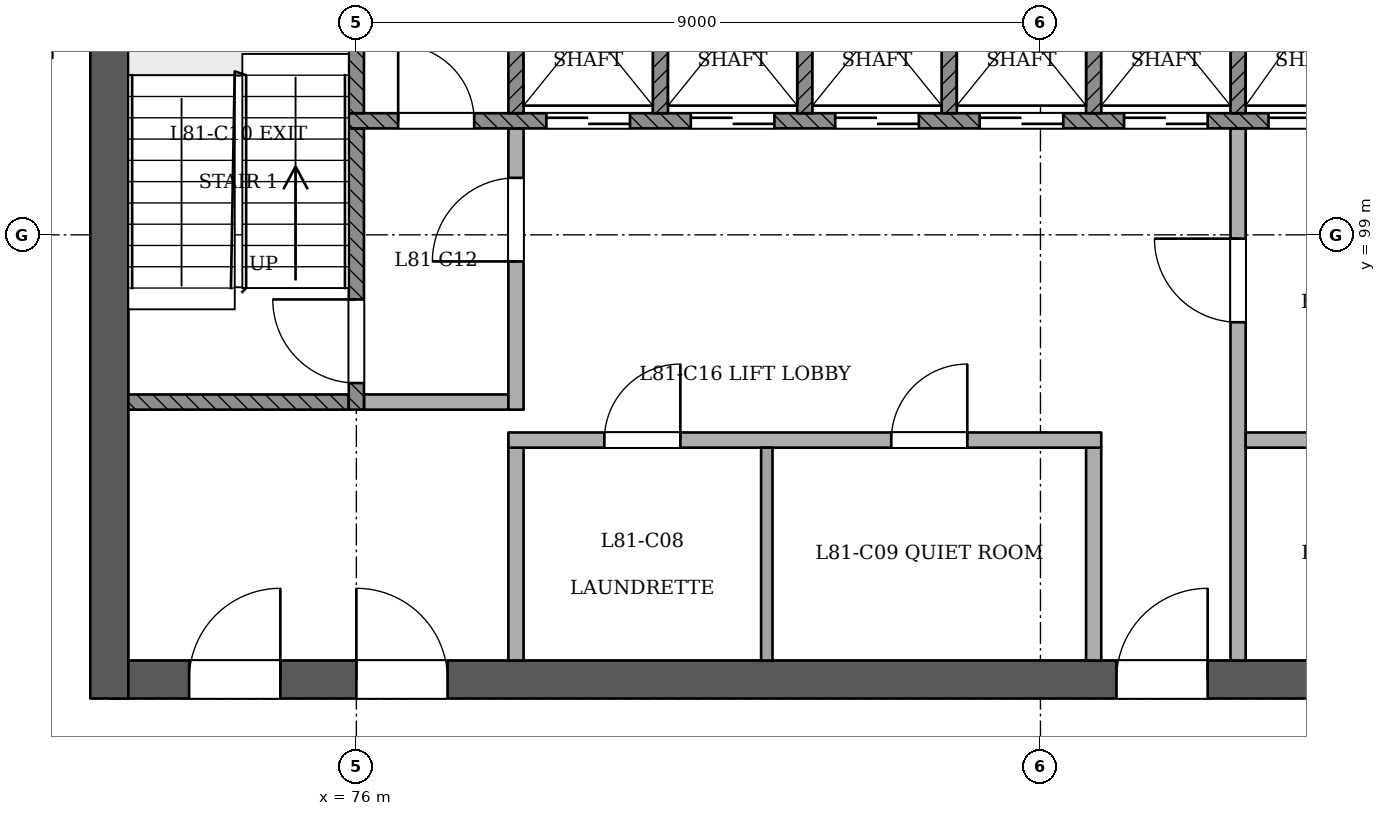
"""IFC4 building model, lengths in metres.
Left out: names, types, materials, properties, quantities, classifications, styles, units other than length and angle.
Written with IfcOpenShell. Run it as: python <this file> out.ifc"""

import sys

from ifc_helpers import new_model, si_unit, direction, frame, frame_2d, origin, place, context, subcontext, project, spatial, rectangle, extrude, element, fill, save


model = new_model("IFC4")
c1 = context("Model", 3, precision=1e-05, world=origin(), true_north=direction((0.0, 1.0)))
c2 = subcontext(c1, "Body", "Model", "MODEL_VIEW")
j1 = project(units=[si_unit("LENGTHUNIT", "METRE"), si_unit("PLANEANGLEUNIT", "RADIAN")], contexts=[c1])
p1 = place(None, origin())
s1 = spatial("IfcSite", under=j1, at=p1, CompositionType="ELEMENT")
p2 = place(p1, origin())
s2 = spatial("IfcBuilding", under=s1, at=p2, CompositionType="ELEMENT")
p3 = place(p2, frame((0.0, 0.0, 313.0)))
s3 = spatial("IfcBuildingStorey", under=s2, at=p3, CompositionType="ELEMENT", Elevation=313.0)
p4 = place(p3, frame((72.75, 93.15, 0.0), z_axis=(0.0, 0.0, 1.0), x_axis=(1.0, 0.0, 0.0)))
e1 = element("IfcWall", 1, at=p4, inside=s3, PredefinedType="SHEAR", context=c2, shape_type="SweptSolid", body=[
    extrude(rectangle(XDim=24.75, YDim=0.5, at=frame_2d((12.375, 0.0))), origin(), (0.0, 0.0, 1.0), 3.6),
])
p5 = place(p4, frame((1.05, 0.0, 0.0)))
e2 = element("IfcOpeningElement", 2, at=p5, cuts=e1, PredefinedType="OPENING", context=c2, shape_type="SweptSolid", body=[
    extrude(rectangle(XDim=1.2, YDim=2.1, at=frame_2d((0.6, 1.05))), frame((0.0, 0.26, 0.0), z_axis=(0.0, -1.0, 0.0), x_axis=(1.0, 0.0, 0.0)), (0.0, 0.0, 1.0), 0.521),
])
p6 = place(p4, frame((3.25, 0.0, 0.0)))
e3 = element("IfcOpeningElement", 3, at=p6, cuts=e1, PredefinedType="OPENING", context=c2, shape_type="SweptSolid", body=[
    extrude(rectangle(XDim=1.2, YDim=2.1, at=frame_2d((0.6, 1.05))), frame((0.0, 0.26, 0.0), z_axis=(0.0, -1.0, 0.0), x_axis=(1.0, 0.0, 0.0)), (0.0, 0.0, 1.0), 0.521),
])
p7 = place(p4, frame((13.25, 0.0, 0.0)))
e4 = element("IfcOpeningElement", 4, at=p7, cuts=e1, PredefinedType="OPENING", context=c2, shape_type="SweptSolid", body=[
    extrude(rectangle(XDim=1.2, YDim=2.1, at=frame_2d((0.6, 1.05))), frame((0.0, 0.26, 0.0), z_axis=(0.0, -1.0, 0.0), x_axis=(1.0, 0.0, 0.0)), (0.0, 0.0, 1.0), 0.521),
])
p8 = place(p4, frame((16.663, 0.0, 0.0)))
e5 = element("IfcOpeningElement", 5, at=p8, cuts=e1, PredefinedType="OPENING", context=c2, shape_type="SweptSolid", body=[
    extrude(rectangle(XDim=1.0, YDim=2.1, at=frame_2d((0.5, 1.05))), frame((0.0, 0.26, 0.0), z_axis=(0.0, -1.0, 0.0), x_axis=(1.0, 0.0, 0.0)), (0.0, 0.0, 1.0), 0.521),
])
p9 = place(p4, frame((20.55, 0.0, 0.0)))
e6 = element("IfcOpeningElement", 6, at=p9, cuts=e1, PredefinedType="OPENING", context=c2, shape_type="SweptSolid", body=[
    extrude(rectangle(XDim=1.0, YDim=2.1, at=frame_2d((0.5, 1.05))), frame((0.0, 0.26, 0.0), z_axis=(0.0, -1.0, 0.0), x_axis=(1.0, 0.0, 0.0)), (0.0, 0.0, 1.0), 0.521),
])
p10 = place(p4, frame((22.988, 0.0, 0.0)))
e7 = element("IfcOpeningElement", 7, at=p10, cuts=e1, PredefinedType="OPENING", context=c2, shape_type="SweptSolid", body=[
    extrude(rectangle(XDim=1.0, YDim=2.1, at=frame_2d((0.5, 1.05))), frame((0.0, 0.26, 0.0), z_axis=(0.0, -1.0, 0.0), x_axis=(1.0, 0.0, 0.0)), (0.0, 0.0, 1.0), 0.521),
])
p11 = place(p3, frame((72.75, 103.65, 0.0), z_axis=(0.0, 0.0, 1.0), x_axis=(0.0, -1.0, 0.0)))
e8 = element("IfcWall", 8, at=p11, inside=s3, PredefinedType="SHEAR", context=c2, shape_type="SweptSolid", body=[
    extrude(rectangle(XDim=10.75, YDim=0.5, at=frame_2d((5.375, 0.0))), origin(), (0.0, 0.0, 1.0), 3.6),
])
p12 = place(p3, frame((78.1, 93.4, 0.0), z_axis=(0.0, 0.0, 1.0), x_axis=(0.0, 1.0, 0.0)))
e9 = element("IfcWall", 9, at=p12, inside=s3, PredefinedType="PARTITIONING", context=c2, shape_type="SweptSolid", body=[
    extrude(rectangle(XDim=2.8, YDim=0.2, at=frame_2d((1.4, 0.0))), origin(), (0.0, 0.0, 1.0), 3.2),
])
p13 = place(p3, frame((81.4, 93.4, 0.0), z_axis=(0.0, 0.0, 1.0), x_axis=(0.0, 1.0, 0.0)))
e10 = element("IfcWall", 10, at=p13, inside=s3, PredefinedType="PARTITIONING", context=c2, shape_type="SweptSolid", body=[
    extrude(rectangle(XDim=2.8, YDim=0.15, at=frame_2d((1.4, 0.0))), origin(), (0.0, 0.0, 1.0), 3.2),
])
p14 = place(p3, frame((85.7, 93.4, 0.0), z_axis=(0.0, 0.0, 1.0), x_axis=(0.0, 1.0, 0.0)))
e11 = element("IfcWall", 11, at=p14, inside=s3, PredefinedType="PARTITIONING", context=c2, shape_type="SweptSolid", body=[
    extrude(rectangle(XDim=2.8, YDim=0.2, at=frame_2d((1.4, 0.0))), origin(), (0.0, 0.0, 1.0), 3.2),
])
p15 = place(p3, frame((87.6, 93.4, 0.0), z_axis=(0.0, 0.0, 1.0), x_axis=(0.0, 1.0, 0.0)))
e12 = element("IfcWall", 12, at=p15, inside=s3, PredefinedType="PARTITIONING", context=c2, shape_type="SweptSolid", body=[
    extrude(rectangle(XDim=7.0, YDim=0.2, at=frame_2d((3.5, 0.0))), origin(), (0.0, 0.0, 1.0), 3.2),
])
p16 = place(p15, frame((4.45, 0.0, 0.0)))
e13 = element("IfcOpeningElement", 13, at=p16, cuts=e12, PredefinedType="OPENING", context=c2, shape_type="SweptSolid", body=[
    extrude(rectangle(XDim=1.1, YDim=2.1, at=frame_2d((0.55, 1.05))), frame((0.0, 0.11, 0.0), z_axis=(0.0, -1.0, 0.0), x_axis=(1.0, 0.0, 0.0)), (0.0, 0.0, 1.0), 0.221),
])
p17 = place(p3, frame((78.0, 96.3, 0.0), z_axis=(0.0, 0.0, 1.0), x_axis=(1.0, 0.0, 0.0)))
e14 = element("IfcWall", 14, at=p17, inside=s3, PredefinedType="PARTITIONING", context=c2, shape_type="SweptSolid", body=[
    extrude(rectangle(XDim=7.8, YDim=0.2, at=frame_2d((3.9, 0.0))), origin(), (0.0, 0.0, 1.0), 3.2),
])
p18 = place(p17, frame((1.262, 0.0, 0.0)))
e15 = element("IfcOpeningElement", 15, at=p18, cuts=e14, PredefinedType="OPENING", context=c2, shape_type="SweptSolid", body=[
    extrude(rectangle(XDim=1.0, YDim=2.1, at=frame_2d((0.5, 1.05))), frame((0.0, 0.11, 0.0), z_axis=(0.0, -1.0, 0.0), x_axis=(1.0, 0.0, 0.0)), (0.0, 0.0, 1.0), 0.221),
])
p19 = place(p17, frame((5.038, 0.0, 0.0)))
e16 = element("IfcOpeningElement", 16, at=p19, cuts=e14, PredefinedType="OPENING", context=c2, shape_type="SweptSolid", body=[
    extrude(rectangle(XDim=1.0, YDim=2.1, at=frame_2d((0.5, 1.05))), frame((0.0, 0.11, 0.0), z_axis=(0.0, -1.0, 0.0), x_axis=(1.0, 0.0, 0.0)), (0.0, 0.0, 1.0), 0.221),
])
p20 = place(p3, frame((87.7, 96.3, 0.0), z_axis=(0.0, 0.0, 1.0), x_axis=(1.0, 0.0, 0.0)))
e17 = element("IfcWall", 17, at=p20, inside=s3, PredefinedType="PARTITIONING", context=c2, shape_type="SweptSolid", body=[
    extrude(rectangle(XDim=3.6, YDim=0.2, at=frame_2d((1.8, 0.0))), origin(), (0.0, 0.0, 1.0), 3.2),
])
p21 = place(p3, frame((73.0, 96.8, 0.0), z_axis=(0.0, 0.0, 1.0), x_axis=(1.0, 0.0, 0.0)))
e18 = element("IfcWall", 18, at=p21, inside=s3, PredefinedType="SOLIDWALL", context=c2, shape_type="SweptSolid", body=[
    extrude(rectangle(XDim=2.9, YDim=0.2, at=frame_2d((1.45, 0.0))), origin(), (0.0, 0.0, 1.0), 3.2),
])
p22 = place(p3, frame((76.0, 96.7, 0.0), z_axis=(0.0, 0.0, 1.0), x_axis=(0.0, 1.0, 0.0)))
e19 = element("IfcWall", 19, at=p22, inside=s3, PredefinedType="SOLIDWALL", context=c2, shape_type="SweptSolid", body=[
    extrude(rectangle(XDim=3.7, YDim=0.2, at=frame_2d((1.85, 0.0))), origin(), (0.0, 0.0, 1.0), 3.2),
])
p23 = place(p22, frame((0.35, 0.0, 0.0)))
e20 = element("IfcOpeningElement", 20, at=p23, cuts=e19, PredefinedType="OPENING", context=c2, shape_type="SweptSolid", body=[
    extrude(rectangle(XDim=1.1, YDim=2.1, at=frame_2d((0.55, 1.05))), frame((0.0, 0.11, 0.0), z_axis=(0.0, -1.0, 0.0), x_axis=(1.0, 0.0, 0.0)), (0.0, 0.0, 1.0), 0.221),
])
p24 = place(p3, frame((76.1, 96.8, 0.0), z_axis=(0.0, 0.0, 1.0), x_axis=(1.0, 0.0, 0.0)))
e21 = element("IfcWall", 21, at=p24, inside=s3, PredefinedType="PARTITIONING", context=c2, shape_type="SweptSolid", body=[
    extrude(rectangle(XDim=1.9, YDim=0.2, at=frame_2d((0.95, 0.0))), origin(), (0.0, 0.0, 1.0), 3.2),
])
p25 = place(p3, frame((78.1, 96.7, 0.0), z_axis=(0.0, 0.0, 1.0), x_axis=(0.0, 1.0, 0.0)))
e22 = element("IfcWall", 22, at=p25, inside=s3, PredefinedType="PARTITIONING", context=c2, shape_type="SweptSolid", body=[
    extrude(rectangle(XDim=3.7, YDim=0.2, at=frame_2d((1.85, 0.0))), origin(), (0.0, 0.0, 1.0), 3.2),
])
p26 = place(p25, frame((1.95, 0.0, 0.0)))
e23 = element("IfcOpeningElement", 23, at=p26, cuts=e22, PredefinedType="OPENING", context=c2, shape_type="SweptSolid", body=[
    extrude(rectangle(XDim=1.1, YDim=2.1, at=frame_2d((0.55, 1.05))), frame((0.0, 0.11, 0.0), z_axis=(0.0, -1.0, 0.0), x_axis=(1.0, 0.0, 0.0)), (0.0, 0.0, 1.0), 0.221),
])
p27 = place(p3, frame((75.9, 100.5, 0.0), z_axis=(0.0, 0.0, 1.0), x_axis=(1.0, 0.0, 0.0)))
e24 = element("IfcWall", 24, at=p27, inside=s3, PredefinedType="SOLIDWALL", context=c2, shape_type="SweptSolid", body=[
    extrude(rectangle(XDim=18.2, YDim=0.2, at=frame_2d((9.1, 0.0))), origin(), (0.0, 0.0, 1.0), 3.2),
])
p28 = place(p27, frame((2.6, 0.0, 0.0)))
e25 = element("IfcOpeningElement", 25, at=p28, cuts=e24, PredefinedType="OPENING", context=c2, shape_type="SweptSolid", body=[
    extrude(rectangle(XDim=1.1, YDim=2.1, at=frame_2d((0.55, 1.05))), frame((0.0, 0.11, 0.0), z_axis=(0.0, -1.0, 0.0), x_axis=(1.0, 0.0, 0.0)), (0.0, 0.0, 1.0), 0.221),
])
p29 = place(p27, frame((4.5, 0.0, 0.0)))
e26 = element("IfcOpeningElement", 26, at=p29, cuts=e24, PredefinedType="OPENING", context=c2, shape_type="SweptSolid", body=[
    extrude(rectangle(XDim=1.1, YDim=2.1, at=frame_2d((0.55, 1.05))), frame((0.0, 0.11, 0.0), z_axis=(0.0, -1.0, 0.0), x_axis=(1.0, 0.0, 0.0)), (0.0, 0.0, 1.0), 0.221),
])
p30 = place(p27, frame((6.4, 0.0, 0.0)))
e27 = element("IfcOpeningElement", 27, at=p30, cuts=e24, PredefinedType="OPENING", context=c2, shape_type="SweptSolid", body=[
    extrude(rectangle(XDim=1.1, YDim=2.1, at=frame_2d((0.55, 1.05))), frame((0.0, 0.11, 0.0), z_axis=(0.0, -1.0, 0.0), x_axis=(1.0, 0.0, 0.0)), (0.0, 0.0, 1.0), 0.221),
])
p31 = place(p27, frame((8.3, 0.0, 0.0)))
e28 = element("IfcOpeningElement", 28, at=p31, cuts=e24, PredefinedType="OPENING", context=c2, shape_type="SweptSolid", body=[
    extrude(rectangle(XDim=1.1, YDim=2.1, at=frame_2d((0.55, 1.05))), frame((0.0, 0.11, 0.0), z_axis=(0.0, -1.0, 0.0), x_axis=(1.0, 0.0, 0.0)), (0.0, 0.0, 1.0), 0.221),
])
p32 = place(p27, frame((10.2, 0.0, 0.0)))
e29 = element("IfcOpeningElement", 29, at=p32, cuts=e24, PredefinedType="OPENING", context=c2, shape_type="SweptSolid", body=[
    extrude(rectangle(XDim=1.1, YDim=2.1, at=frame_2d((0.55, 1.05))), frame((0.0, 0.11, 0.0), z_axis=(0.0, -1.0, 0.0), x_axis=(1.0, 0.0, 0.0)), (0.0, 0.0, 1.0), 0.221),
])
p33 = place(p27, frame((12.1, 0.0, 0.0)))
e30 = element("IfcOpeningElement", 30, at=p33, cuts=e24, PredefinedType="OPENING", context=c2, shape_type="SweptSolid", body=[
    extrude(rectangle(XDim=1.1, YDim=2.1, at=frame_2d((0.55, 1.05))), frame((0.0, 0.11, 0.0), z_axis=(0.0, -1.0, 0.0), x_axis=(1.0, 0.0, 0.0)), (0.0, 0.0, 1.0), 0.221),
])
p34 = place(p27, frame((14.0, 0.0, 0.0)))
e31 = element("IfcOpeningElement", 31, at=p34, cuts=e24, PredefinedType="OPENING", context=c2, shape_type="SweptSolid", body=[
    extrude(rectangle(XDim=1.1, YDim=2.1, at=frame_2d((0.55, 1.05))), frame((0.0, 0.11, 0.0), z_axis=(0.0, -1.0, 0.0), x_axis=(1.0, 0.0, 0.0)), (0.0, 0.0, 1.0), 0.221),
])
p35 = place(p27, frame((0.65, 0.0, 0.0)))
e32 = element("IfcOpeningElement", 32, at=p35, cuts=e24, PredefinedType="OPENING", context=c2, shape_type="SweptSolid", body=[
    extrude(rectangle(XDim=1.0, YDim=2.1, at=frame_2d((0.5, 1.05))), frame((0.0, 0.11, 0.0), z_axis=(0.0, -1.0, 0.0), x_axis=(1.0, 0.0, 0.0)), (0.0, 0.0, 1.0), 0.221),
])
p36 = place(p27, frame((16.3, 0.0, 0.0)))
e33 = element("IfcOpeningElement", 33, at=p36, cuts=e24, PredefinedType="OPENING", context=c2, shape_type="SweptSolid", body=[
    extrude(rectangle(XDim=1.0, YDim=2.1, at=frame_2d((0.5, 1.05))), frame((0.0, 0.11, 0.0), z_axis=(0.0, -1.0, 0.0), x_axis=(1.0, 0.0, 0.0)), (0.0, 0.0, 1.0), 0.221),
])
for number, where, z_axis, x_axis in (
    (34, (76.0, 100.6, 0.0), (0.0, 0.0, 1.0), (0.0, 1.0, 0.0)),
    (35, (78.1, 100.6, 0.0), (0.0, 0.0, 1.0), (0.0, 1.0, 0.0)),
    (36, (80.0, 100.6, 0.0), (0.0, 0.0, 1.0), (0.0, 1.0, 0.0)),
    (37, (81.9, 100.6, 0.0), (0.0, 0.0, 1.0), (0.0, 1.0, 0.0)),
    (38, (83.8, 100.6, 0.0), (0.0, 0.0, 1.0), (0.0, 1.0, 0.0)),
    (39, (85.7, 100.6, 0.0), (0.0, 0.0, 1.0), (0.0, 1.0, 0.0)),
    (40, (87.6, 100.6, 0.0), (0.0, 0.0, 1.0), (0.0, 1.0, 0.0)),
):
    element("IfcWall", number, at=place(p3, frame(where, z_axis=z_axis, x_axis=x_axis)), inside=s3, PredefinedType="SOLIDWALL", context=c2, shape_type="SweptSolid", body=[
        extrude(rectangle(XDim=2.8, YDim=0.2, at=frame_2d((1.4, 0.0))), origin(), (0.0, 0.0, 1.0), 3.2),
    ])
p37 = place(p28, origin())
e41 = element("IfcDoor", 41, at=p37, inside=s3, OperationType="SLIDING_TO_RIGHT", PredefinedType="NOTDEFINED", context=c2, shape_type="SweptSolid", body=[
    extrude(rectangle(XDim=1.1, YDim=2.1, at=frame_2d((0.55, 1.05))), frame((0.0, 0.025, 0.0), z_axis=(0.0, -1.0, 0.0), x_axis=(1.0, 0.0, 0.0)), (0.0, 0.0, 1.0), 0.05),
])
fill(e25, e41)
p38 = place(p29, origin())
e42 = element("IfcDoor", 42, at=p38, inside=s3, OperationType="SLIDING_TO_LEFT", PredefinedType="NOTDEFINED", context=c2, shape_type="SweptSolid", body=[
    extrude(rectangle(XDim=1.1, YDim=2.1, at=frame_2d((0.55, 1.05))), frame((0.0, 0.025, 0.0), z_axis=(0.0, -1.0, 0.0), x_axis=(1.0, 0.0, 0.0)), (0.0, 0.0, 1.0), 0.05),
])
fill(e26, e42)
p39 = place(p30, origin())
e43 = element("IfcDoor", 43, at=p39, inside=s3, OperationType="SLIDING_TO_RIGHT", PredefinedType="NOTDEFINED", context=c2, shape_type="SweptSolid", body=[
    extrude(rectangle(XDim=1.1, YDim=2.1, at=frame_2d((0.55, 1.05))), frame((0.0, 0.025, 0.0), z_axis=(0.0, -1.0, 0.0), x_axis=(1.0, 0.0, 0.0)), (0.0, 0.0, 1.0), 0.05),
])
fill(e27, e43)
p40 = place(p31, origin())
e44 = element("IfcDoor", 44, at=p40, inside=s3, OperationType="SLIDING_TO_LEFT", PredefinedType="NOTDEFINED", context=c2, shape_type="SweptSolid", body=[
    extrude(rectangle(XDim=1.1, YDim=2.1, at=frame_2d((0.55, 1.05))), frame((0.0, 0.025, 0.0), z_axis=(0.0, -1.0, 0.0), x_axis=(1.0, 0.0, 0.0)), (0.0, 0.0, 1.0), 0.05),
])
fill(e28, e44)
p41 = place(p32, origin())
e45 = element("IfcDoor", 45, at=p41, inside=s3, OperationType="SLIDING_TO_RIGHT", PredefinedType="NOTDEFINED", context=c2, shape_type="SweptSolid", body=[
    extrude(rectangle(XDim=1.1, YDim=2.1, at=frame_2d((0.55, 1.05))), frame((0.0, 0.025, 0.0), z_axis=(0.0, -1.0, 0.0), x_axis=(1.0, 0.0, 0.0)), (0.0, 0.0, 1.0), 0.05),
])
fill(e29, e45)
p42 = place(p33, origin())
e46 = element("IfcDoor", 46, at=p42, inside=s3, OperationType="SLIDING_TO_RIGHT", PredefinedType="NOTDEFINED", context=c2, shape_type="SweptSolid", body=[
    extrude(rectangle(XDim=1.1, YDim=2.1, at=frame_2d((0.55, 1.05))), frame((0.0, 0.025, 0.0), z_axis=(0.0, -1.0, 0.0), x_axis=(1.0, 0.0, 0.0)), (0.0, 0.0, 1.0), 0.05),
])
fill(e30, e46)
p43 = place(p23, origin())
e47 = element("IfcDoor", 47, at=p43, inside=s3, OperationType="SINGLE_SWING_RIGHT", PredefinedType="NOTDEFINED", context=c2, shape_type="SweptSolid", body=[
    extrude(rectangle(XDim=1.1, YDim=2.1, at=frame_2d((0.55, 1.05))), frame((0.0, 0.025, 0.0), z_axis=(0.0, -1.0, 0.0), x_axis=(1.0, 0.0, 0.0)), (0.0, 0.0, 1.0), 0.05),
])
fill(e20, e47)
p44 = place(p26, origin())
e48 = element("IfcDoor", 48, at=p44, inside=s3, OperationType="SINGLE_SWING_LEFT", PredefinedType="NOTDEFINED", context=c2, shape_type="SweptSolid", body=[
    extrude(rectangle(XDim=1.1, YDim=2.1, at=frame_2d((0.55, 1.05))), frame((0.0, 0.025, 0.0), z_axis=(0.0, -1.0, 0.0), x_axis=(1.0, 0.0, 0.0)), (0.0, 0.0, 1.0), 0.05),
])
fill(e23, e48)
p45 = place(p16, origin())
e49 = element("IfcDoor", 49, at=p45, inside=s3, OperationType="SINGLE_SWING_RIGHT", PredefinedType="NOTDEFINED", context=c2, shape_type="SweptSolid", body=[
    extrude(rectangle(XDim=1.1, YDim=2.1, at=frame_2d((0.55, 1.05))), frame((0.0, 0.025, 0.0), z_axis=(0.0, -1.0, 0.0), x_axis=(1.0, 0.0, 0.0)), (0.0, 0.0, 1.0), 0.05),
])
fill(e13, e49)
p46 = place(p5, origin())
e50 = element("IfcDoor", 50, at=p46, inside=s3, OperationType="SINGLE_SWING_RIGHT", PredefinedType="NOTDEFINED", context=c2, shape_type="SweptSolid", body=[
    extrude(rectangle(XDim=1.2, YDim=2.1, at=frame_2d((0.6, 1.05))), frame((0.0, 0.025, 0.0), z_axis=(0.0, -1.0, 0.0), x_axis=(1.0, 0.0, 0.0)), (0.0, 0.0, 1.0), 0.05),
])
fill(e2, e50)
p47 = place(p6, origin())
e51 = element("IfcDoor", 51, at=p47, inside=s3, OperationType="SINGLE_SWING_LEFT", PredefinedType="NOTDEFINED", context=c2, shape_type="SweptSolid", body=[
    extrude(rectangle(XDim=1.2, YDim=2.1, at=frame_2d((0.6, 1.05))), frame((0.0, 0.025, 0.0), z_axis=(0.0, -1.0, 0.0), x_axis=(1.0, 0.0, 0.0)), (0.0, 0.0, 1.0), 0.05),
])
fill(e3, e51)
p48 = place(p7, origin())
e52 = element("IfcDoor", 52, at=p48, inside=s3, OperationType="SINGLE_SWING_RIGHT", PredefinedType="NOTDEFINED", context=c2, shape_type="SweptSolid", body=[
    extrude(rectangle(XDim=1.2, YDim=2.1, at=frame_2d((0.6, 1.05))), frame((0.0, 0.025, 0.0), z_axis=(0.0, -1.0, 0.0), x_axis=(1.0, 0.0, 0.0)), (0.0, 0.0, 1.0), 0.05),
])
fill(e4, e52)
p49 = place(p35, origin())
e53 = element("IfcDoor", 53, at=p49, inside=s3, OperationType="SINGLE_SWING_LEFT", PredefinedType="NOTDEFINED", context=c2, shape_type="SweptSolid", body=[
    extrude(rectangle(XDim=1.0, YDim=2.1, at=frame_2d((0.5, 1.05))), frame((0.0, 0.025, 0.0), z_axis=(0.0, -1.0, 0.0), x_axis=(1.0, 0.0, 0.0)), (0.0, 0.0, 1.0), 0.05),
])
fill(e32, e53)
p50 = place(p18, origin())
e54 = element("IfcDoor", 54, at=p50, inside=s3, OperationType="SINGLE_SWING_RIGHT", PredefinedType="NOTDEFINED", context=c2, shape_type="SweptSolid", body=[
    extrude(rectangle(XDim=1.0, YDim=2.1, at=frame_2d((0.5, 1.05))), frame((0.0, 0.025, 0.0), z_axis=(0.0, -1.0, 0.0), x_axis=(1.0, 0.0, 0.0)), (0.0, 0.0, 1.0), 0.05),
])
fill(e15, e54)
p51 = place(p19, origin())
e55 = element("IfcDoor", 55, at=p51, inside=s3, OperationType="SINGLE_SWING_RIGHT", PredefinedType="NOTDEFINED", context=c2, shape_type="SweptSolid", body=[
    extrude(rectangle(XDim=1.0, YDim=2.1, at=frame_2d((0.5, 1.05))), frame((0.0, 0.025, 0.0), z_axis=(0.0, -1.0, 0.0), x_axis=(1.0, 0.0, 0.0)), (0.0, 0.0, 1.0), 0.05),
])
fill(e16, e55)
save(model, sys.argv[1])
